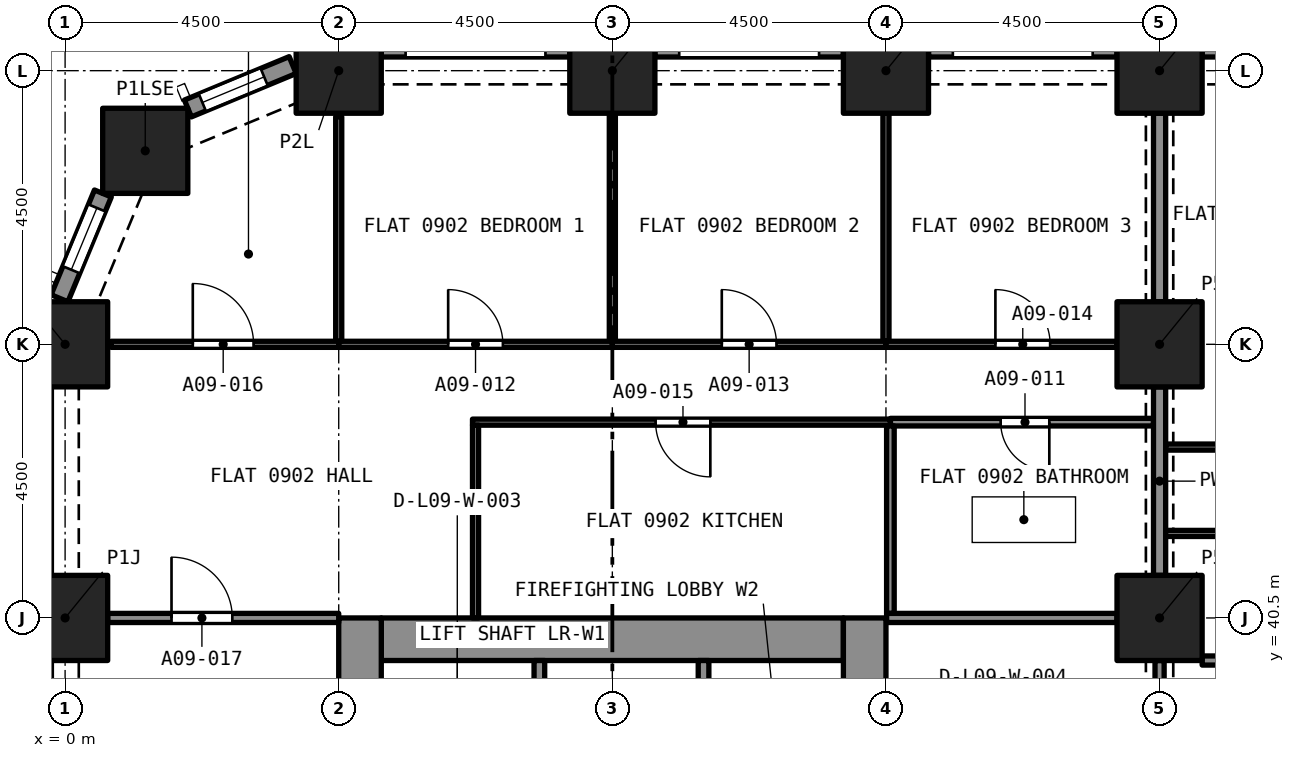
"""IFC4 building model, lengths in metres.
Left out: names, types, materials, properties, quantities, classifications, styles, units other than length and angle.
Written with IfcOpenShell. Run it as: python <this file> out.ifc"""

import sys

from ifc_helpers import new_model, si_unit, direction, frame, frame_2d, origin, origin_2d, place, context, subcontext, project, spatial, rectangle, extrude, element, fill, save


model = new_model("IFC4")
c1 = context("Model", 3, precision=1e-05, world=origin(), true_north=direction((0.0, 1.0)))
c2 = subcontext(c1, "Body", "Model", "MODEL_VIEW")
j1 = project(units=[si_unit("LENGTHUNIT", "METRE"), si_unit("PLANEANGLEUNIT", "RADIAN")], contexts=[c1])
p1 = place(None, origin())
s1 = spatial("IfcSite", under=j1, at=p1, CompositionType="ELEMENT")
p2 = place(p1, origin())
s2 = spatial("IfcBuilding", under=s1, at=p2, CompositionType="ELEMENT")
p3 = place(p2, frame((0.0, 0.0, 40.0)))
s3 = spatial("IfcBuildingStorey", under=s2, at=p3, CompositionType="ELEMENT", Elevation=40.0)
for number, where, z_axis, x_axis in (
    (1, (0.0, 40.5, 0.0), (0.0, 0.0, 1.0), (1.0, 0.0, 0.0)),
    (2, (18.0, 40.5, 0.0), (0.0, 0.0, 1.0), (1.0, 0.0, 0.0)),
    (3, (0.0, 45.0, 0.0), (0.0, 0.0, 1.0), (1.0, 0.0, 0.0)),
    (4, (18.0, 45.0, 0.0), (0.0, 0.0, 1.0), (1.0, 0.0, 0.0)),
    (5, (1.318, 48.182, 0.0), (0.0, 0.0, 1.0), (1.0, 0.0, 0.0)),
    (6, (4.5, 49.5, 0.0), (0.0, 0.0, 1.0), (1.0, 0.0, 0.0)),
    (7, (9.0, 49.5, 0.0), (0.0, 0.0, 1.0), (1.0, 0.0, 0.0)),
    (8, (13.5, 49.5, 0.0), (0.0, 0.0, 1.0), (1.0, 0.0, 0.0)),
    (9, (18.0, 49.5, 0.0), (0.0, 0.0, 1.0), (1.0, 0.0, 0.0)),
):
    element("IfcColumn", number, at=place(p3, frame(where, z_axis=z_axis, x_axis=x_axis)), inside=s3, PredefinedType="COLUMN", context=c2, shape_type="SweptSolid", body=[
        extrude(rectangle(XDim=1.4, YDim=1.4, at=origin_2d()), origin(), (0.0, 0.0, 1.0), 3.2),
    ])
p4 = place(p3, frame((5.2, 40.15, 0.0), z_axis=(0.0, 0.0, 1.0), x_axis=(1.0, 0.0, 0.0)))
e10 = element("IfcWall", 10, at=p4, inside=s3, PredefinedType="SOLIDWALL", context=c2, shape_type="SweptSolid", body=[
    extrude(rectangle(XDim=7.6, YDim=0.7, at=frame_2d((3.8, 0.0))), origin(), (0.0, 0.0, 1.0), 3.2),
])
p5 = place(p3, frame((4.85, 27.0, 0.0), z_axis=(0.0, 0.0, 1.0), x_axis=(0.0, 1.0, 0.0)))
e11 = element("IfcWall", 11, at=p5, inside=s3, PredefinedType="SOLIDWALL", context=c2, shape_type="SweptSolid", body=[
    extrude(rectangle(XDim=13.5, YDim=0.7, at=frame_2d((6.75, 0.0))), origin(), (0.0, 0.0, 1.0), 3.2),
])
p6 = place(p5, frame((8.95, 0.0, 0.0)))
e12 = element("IfcOpeningElement", 12, at=p6, cuts=e11, PredefinedType="OPENING", context=c2, shape_type="SweptSolid", body=[
    extrude(rectangle(XDim=1.2, YDim=2.1, at=frame_2d((0.6, 1.05))), frame((0.0, 0.36, 0.0), z_axis=(0.0, -1.0, 0.0), x_axis=(1.0, 0.0, 0.0)), (0.0, 0.0, 1.0), 0.72),
])
p7 = place(p3, frame((13.15, 27.0, 0.0), z_axis=(0.0, 0.0, 1.0), x_axis=(0.0, 1.0, 0.0)))
e13 = element("IfcWall", 13, at=p7, inside=s3, PredefinedType="SOLIDWALL", context=c2, shape_type="SweptSolid", body=[
    extrude(rectangle(XDim=13.5, YDim=0.7, at=frame_2d((6.75, 0.0))), origin(), (0.0, 0.0, 1.0), 3.2),
])
p8 = place(p7, frame((11.1, 0.0, 0.0)))
e14 = element("IfcOpeningElement", 14, at=p8, cuts=e13, PredefinedType="OPENING", context=c2, shape_type="SweptSolid", body=[
    extrude(rectangle(XDim=1.1, YDim=2.1, at=frame_2d((0.55, 1.05))), frame((0.0, 0.36, 0.0), z_axis=(0.0, -1.0, 0.0), x_axis=(1.0, 0.0, 0.0)), (0.0, 0.0, 1.0), 0.72),
])
p9 = place(p7, frame((8.95, 0.0, 0.0)))
e15 = element("IfcOpeningElement", 15, at=p9, cuts=e13, PredefinedType="OPENING", context=c2, shape_type="SweptSolid", body=[
    extrude(rectangle(XDim=1.2, YDim=2.1, at=frame_2d((0.6, 1.05))), frame((0.0, 0.36, 0.0), z_axis=(0.0, -1.0, 0.0), x_axis=(1.0, 0.0, 0.0)), (0.0, 0.0, 1.0), 0.72),
])
p10 = place(p3, frame((18.7, 49.875, 0.0), z_axis=(0.0, 0.0, 1.0), x_axis=(1.0, 0.0, 0.0)))
e16 = element("IfcWall", 16, at=p10, inside=s3, PredefinedType="SOLIDWALL", context=c2, shape_type="SweptSolid", body=[
    extrude(rectangle(XDim=3.1, YDim=0.3, at=frame_2d((1.55, 0.0))), origin(), (0.0, 0.0, 1.0), 3.2),
])
p11 = place(p10, frame((0.4, 0.0, 0.45)))
e17 = element("IfcOpeningElement", 17, at=p11, cuts=e16, PredefinedType="OPENING", context=c2, shape_type="SweptSolid", body=[
    extrude(rectangle(XDim=2.3, YDim=1.95, at=frame_2d((1.15, 0.975))), frame((0.0, 0.16, 0.0), z_axis=(0.0, -1.0, 0.0), x_axis=(1.0, 0.0, 0.0)), (0.0, 0.0, 1.0), 0.32),
])
p12 = place(p3, frame((14.2, 49.875, 0.0), z_axis=(0.0, 0.0, 1.0), x_axis=(1.0, 0.0, 0.0)))
e18 = element("IfcWall", 18, at=p12, inside=s3, PredefinedType="SOLIDWALL", context=c2, shape_type="SweptSolid", body=[
    extrude(rectangle(XDim=3.1, YDim=0.3, at=frame_2d((1.55, 0.0))), origin(), (0.0, 0.0, 1.0), 3.2),
])
p13 = place(p12, frame((0.4, 0.0, 0.45)))
e19 = element("IfcOpeningElement", 19, at=p13, cuts=e18, PredefinedType="OPENING", context=c2, shape_type="SweptSolid", body=[
    extrude(rectangle(XDim=2.3, YDim=1.95, at=frame_2d((1.15, 0.975))), frame((0.0, 0.16, 0.0), z_axis=(0.0, -1.0, 0.0), x_axis=(1.0, 0.0, 0.0)), (0.0, 0.0, 1.0), 0.32),
])
p14 = place(p3, frame((9.7, 49.875, 0.0), z_axis=(0.0, 0.0, 1.0), x_axis=(1.0, 0.0, 0.0)))
e20 = element("IfcWall", 20, at=p14, inside=s3, PredefinedType="SOLIDWALL", context=c2, shape_type="SweptSolid", body=[
    extrude(rectangle(XDim=3.1, YDim=0.3, at=frame_2d((1.55, 0.0))), origin(), (0.0, 0.0, 1.0), 3.2),
])
p15 = place(p14, frame((0.4, 0.0, 0.45)))
e21 = element("IfcOpeningElement", 21, at=p15, cuts=e20, PredefinedType="OPENING", context=c2, shape_type="SweptSolid", body=[
    extrude(rectangle(XDim=2.3, YDim=1.95, at=frame_2d((1.15, 0.975))), frame((0.0, 0.16, 0.0), z_axis=(0.0, -1.0, 0.0), x_axis=(1.0, 0.0, 0.0)), (0.0, 0.0, 1.0), 0.32),
])
p16 = place(p3, frame((5.2, 49.875, 0.0), z_axis=(0.0, 0.0, 1.0), x_axis=(1.0, 0.0, 0.0)))
e22 = element("IfcWall", 22, at=p16, inside=s3, PredefinedType="SOLIDWALL", context=c2, shape_type="SweptSolid", body=[
    extrude(rectangle(XDim=3.1, YDim=0.3, at=frame_2d((1.55, 0.0))), origin(), (0.0, 0.0, 1.0), 3.2),
])
p17 = place(p16, frame((0.4, 0.0, 0.45)))
e23 = element("IfcOpeningElement", 23, at=p17, cuts=e22, PredefinedType="OPENING", context=c2, shape_type="SweptSolid", body=[
    extrude(rectangle(XDim=2.3, YDim=1.95, at=frame_2d((1.15, 0.975))), frame((0.0, 0.16, 0.0), z_axis=(0.0, -1.0, 0.0), x_axis=(1.0, 0.0, 0.0)), (0.0, 0.0, 1.0), 0.32),
])
p18 = place(p3, frame((2.02, 48.878, 0.0), z_axis=(0.0, 0.0, 1.0), x_axis=(0.923903565336, 0.38262540684, 0.0)))
e24 = element("IfcWall", 24, at=p18, inside=s3, PredefinedType="SOLIDWALL", context=c2, shape_type="SweptSolid", body=[
    extrude(rectangle(XDim=1.865, YDim=0.3, at=frame_2d((0.933, 0.0))), origin(), (0.0, 0.0, 1.0), 3.2),
])
p19 = place(p18, frame((0.258, 0.0, 0.45)))
e25 = element("IfcOpeningElement", 25, at=p19, cuts=e24, PredefinedType="OPENING", context=c2, shape_type="SweptSolid", body=[
    extrude(rectangle(XDim=1.1, YDim=1.95, at=frame_2d((0.55, 0.975))), frame((0.0, 0.16, 0.0), z_axis=(0.0, -1.0, 0.0), x_axis=(1.0, 0.0, 0.0)), (0.0, 0.0, 1.0), 0.32),
])
p20 = place(p3, frame((-0.092, 45.757, 0.0), z_axis=(0.0, 0.0, 1.0), x_axis=(0.382737135771, 0.923857286003, 0.0)))
e26 = element("IfcWall", 26, at=p20, inside=s3, PredefinedType="SOLIDWALL", context=c2, shape_type="SweptSolid", body=[
    extrude(rectangle(XDim=1.865, YDim=0.3, at=frame_2d((0.933, 0.0))), origin(), (0.0, 0.0, 1.0), 3.2),
])
p21 = place(p20, frame((0.508, 0.0, 0.45)))
e27 = element("IfcOpeningElement", 27, at=p21, cuts=e26, PredefinedType="OPENING", context=c2, shape_type="SweptSolid", body=[
    extrude(rectangle(XDim=1.1, YDim=1.95, at=frame_2d((0.55, 0.975))), frame((0.0, 0.16, 0.0), z_axis=(0.0, -1.0, 0.0), x_axis=(1.0, 0.0, 0.0)), (0.0, 0.0, 1.0), 0.32),
])
p22 = place(p3, frame((17.9, 43.72, 0.0), z_axis=(0.0, 0.0, 1.0), x_axis=(-1.0, 0.0, 0.0)))
e28 = element("IfcWall", 28, at=p22, inside=s3, PredefinedType="PARTITIONING", context=c2, shape_type="SweptSolid", body=[
    extrude(rectangle(XDim=4.327, YDim=0.125, at=frame_2d((2.163, 0.0))), origin(), (0.0, 0.0, 1.0), 2.9),
])
p23 = place(p22, frame((1.713, 0.0, 0.0)))
e29 = element("IfcOpeningElement", 29, at=p23, cuts=e28, PredefinedType="OPENING", context=c2, shape_type="SweptSolid", body=[
    extrude(rectangle(XDim=0.8, YDim=2.1, at=frame_2d((0.4, 1.05))), frame((0.0, 0.073, 0.0), z_axis=(0.0, -1.0, 0.0), x_axis=(1.0, 0.0, 0.0)), (0.0, 0.0, 1.0), 0.145),
])
p24 = place(p3, frame((13.573, 40.575, 0.0), z_axis=(0.0, 0.0, 1.0), x_axis=(0.0, 1.0, 0.0)))
e30 = element("IfcWall", 30, at=p24, inside=s3, PredefinedType="PARTITIONING", context=c2, shape_type="SweptSolid", body=[
    extrude(rectangle(XDim=3.083, YDim=0.125, at=frame_2d((1.541, 0.0))), origin(), (0.0, 0.0, 1.0), 2.9),
])
p25 = place(p3, frame((18.0, 41.2, 0.0), z_axis=(0.0, 0.0, 1.0), x_axis=(0.0, 1.0, 0.0)))
e31 = element("IfcWall", 31, at=p25, inside=s3, PredefinedType="PARTITIONING", context=c2, shape_type="SweptSolid", body=[
    extrude(rectangle(XDim=3.1, YDim=0.2, at=frame_2d((1.55, 0.0))), origin(), (0.0, 0.0, 1.0), 2.38),
])
p26 = place(p3, frame((13.511, 40.5, 0.0), z_axis=(0.0, 0.0, 1.0), x_axis=(1.0, 0.0, 0.0)))
e32 = element("IfcWall", 32, at=p26, inside=s3, PredefinedType="PARTITIONING", context=c2, shape_type="SweptSolid", body=[
    extrude(rectangle(XDim=3.789, YDim=0.15, at=frame_2d((1.895, 0.0))), origin(), (0.0, 0.0, 1.0), 2.9),
])
p27 = place(p3, frame((9.0, 45.05, 0.0), z_axis=(0.0, 0.0, 1.0), x_axis=(0.0, 1.0, 0.0)))
e33 = element("IfcWall", 33, at=p27, inside=s3, PredefinedType="PARTITIONING", context=c2, shape_type="SweptSolid", body=[
    extrude(rectangle(XDim=3.75, YDim=0.1, at=frame_2d((1.875, 0.0))), origin(), (0.0, 0.0, 1.0), 2.9),
])
p28 = place(p3, frame((4.5, 45.0, 0.0), z_axis=(0.0, 0.0, 1.0), x_axis=(1.0, 0.0, 0.0)))
e34 = element("IfcWall", 34, at=p28, inside=s3, PredefinedType="PARTITIONING", context=c2, shape_type="SweptSolid", body=[
    extrude(rectangle(XDim=4.5, YDim=0.1, at=frame_2d((2.25, 0.0))), origin(), (0.0, 0.0, 1.0), 2.9),
])
p29 = place(p28, frame((1.8, 0.0, 0.0)))
e35 = element("IfcOpeningElement", 35, at=p29, cuts=e34, PredefinedType="OPENING", context=c2, shape_type="SweptSolid", body=[
    extrude(rectangle(XDim=0.9, YDim=2.1, at=frame_2d((0.45, 1.05))), frame((0.0, 0.06, 0.0), z_axis=(0.0, -1.0, 0.0), x_axis=(1.0, 0.0, 0.0)), (0.0, 0.0, 1.0), 0.12),
])
p30 = place(p3, frame((4.5, 45.05, 0.0), z_axis=(0.0, 0.0, 1.0), x_axis=(0.0, 1.0, 0.0)))
e36 = element("IfcWall", 36, at=p30, inside=s3, PredefinedType="PARTITIONING", context=c2, shape_type="SweptSolid", body=[
    extrude(rectangle(XDim=3.692, YDim=0.1, at=frame_2d((1.846, 0.0))), origin(), (0.0, 0.0, 1.0), 2.9),
])
p31 = place(p3, frame((13.5, 45.05, 0.0), z_axis=(0.0, 0.0, 1.0), x_axis=(0.0, 1.0, 0.0)))
e37 = element("IfcWall", 37, at=p31, inside=s3, PredefinedType="PARTITIONING", context=c2, shape_type="SweptSolid", body=[
    extrude(rectangle(XDim=3.75, YDim=0.1, at=frame_2d((1.875, 0.0))), origin(), (0.0, 0.0, 1.0), 2.9),
])
p32 = place(p3, frame((9.0, 45.0, 0.0), z_axis=(0.0, 0.0, 1.0), x_axis=(1.0, 0.0, 0.0)))
e38 = element("IfcWall", 38, at=p32, inside=s3, PredefinedType="PARTITIONING", context=c2, shape_type="SweptSolid", body=[
    extrude(rectangle(XDim=4.5, YDim=0.1, at=frame_2d((2.25, 0.0))), origin(), (0.0, 0.0, 1.0), 2.9),
])
p33 = place(p32, frame((1.8, 0.0, 0.0)))
e39 = element("IfcOpeningElement", 39, at=p33, cuts=e38, PredefinedType="OPENING", context=c2, shape_type="SweptSolid", body=[
    extrude(rectangle(XDim=0.9, YDim=2.1, at=frame_2d((0.45, 1.05))), frame((0.0, 0.06, 0.0), z_axis=(0.0, -1.0, 0.0), x_axis=(1.0, 0.0, 0.0)), (0.0, 0.0, 1.0), 0.12),
])
p34 = place(p3, frame((13.5, 45.0, 0.0), z_axis=(0.0, 0.0, 1.0), x_axis=(1.0, 0.0, 0.0)))
e40 = element("IfcWall", 40, at=p34, inside=s3, PredefinedType="PARTITIONING", context=c2, shape_type="SweptSolid", body=[
    extrude(rectangle(XDim=3.8, YDim=0.1, at=frame_2d((1.9, 0.0))), origin(), (0.0, 0.0, 1.0), 2.9),
])
p35 = place(p34, frame((1.8, 0.0, 0.0)))
e41 = element("IfcOpeningElement", 41, at=p35, cuts=e40, PredefinedType="OPENING", context=c2, shape_type="SweptSolid", body=[
    extrude(rectangle(XDim=0.9, YDim=2.1, at=frame_2d((0.45, 1.05))), frame((0.0, 0.06, 0.0), z_axis=(0.0, -1.0, 0.0), x_axis=(1.0, 0.0, 0.0)), (0.0, 0.0, 1.0), 0.12),
])
p36 = place(p3, frame((18.0, 45.7, 0.0), z_axis=(0.0, 0.0, 1.0), x_axis=(0.0, 1.0, 0.0)))
e42 = element("IfcWall", 42, at=p36, inside=s3, PredefinedType="PARTITIONING", context=c2, shape_type="SweptSolid", body=[
    extrude(rectangle(XDim=3.1, YDim=0.2, at=frame_2d((1.55, 0.0))), origin(), (0.0, 0.0, 1.0), 2.38),
])
p37 = place(p3, frame((13.573, 43.72, 0.0), z_axis=(0.0, 0.0, 1.0), x_axis=(-1.0, 0.0, 0.0)))
e43 = element("IfcWall", 43, at=p37, inside=s3, PredefinedType="PARTITIONING", context=c2, shape_type="SweptSolid", body=[
    extrude(rectangle(XDim=6.873, YDim=0.1, at=frame_2d((3.437, 0.0))), origin(), (0.0, 0.0, 1.0), 2.9),
])
p38 = place(p37, frame((2.962, 0.0, 0.0)))
e44 = element("IfcOpeningElement", 44, at=p38, cuts=e43, PredefinedType="OPENING", context=c2, shape_type="SweptSolid", body=[
    extrude(rectangle(XDim=0.9, YDim=2.1, at=frame_2d((0.45, 1.05))), frame((0.0, 0.06, 0.0), z_axis=(0.0, -1.0, 0.0), x_axis=(1.0, 0.0, 0.0)), (0.0, 0.0, 1.0), 0.12),
])
p39 = place(p3, frame((6.75, 40.5, 0.0), z_axis=(0.0, 0.0, 1.0), x_axis=(0.0, 1.0, 0.0)))
e45 = element("IfcWall", 45, at=p39, inside=s3, PredefinedType="PARTITIONING", context=c2, shape_type="SweptSolid", body=[
    extrude(rectangle(XDim=3.17, YDim=0.1, at=frame_2d((1.585, 0.0))), origin(), (0.0, 0.0, 1.0), 2.9),
])
p40 = place(p3, frame((0.758, 45.0, 0.0), z_axis=(0.0, 0.0, 1.0), x_axis=(1.0, 0.0, 0.0)))
e46 = element("IfcWall", 46, at=p40, inside=s3, PredefinedType="PARTITIONING", context=c2, shape_type="SweptSolid", body=[
    extrude(rectangle(XDim=3.742, YDim=0.1, at=frame_2d((1.871, 0.0))), origin(), (0.0, 0.0, 1.0), 2.9),
])
p41 = place(p40, frame((1.342, 0.0, 0.0)))
e47 = element("IfcOpeningElement", 47, at=p41, cuts=e46, PredefinedType="OPENING", context=c2, shape_type="SweptSolid", body=[
    extrude(rectangle(XDim=1.0, YDim=2.1, at=frame_2d((0.5, 1.05))), frame((0.0, 0.06, 0.0), z_axis=(0.0, -1.0, 0.0), x_axis=(1.0, 0.0, 0.0)), (0.0, 0.0, 1.0), 0.12),
])
p42 = place(p3, frame((0.7, 40.5, 0.0), z_axis=(0.0, 0.0, 1.0), x_axis=(1.0, 0.0, 0.0)))
e48 = element("IfcWall", 48, at=p42, inside=s3, PredefinedType="PARTITIONING", context=c2, shape_type="SweptSolid", body=[
    extrude(rectangle(XDim=3.8, YDim=0.15, at=frame_2d((1.9, 0.0))), origin(), (0.0, 0.0, 1.0), 2.9),
])
p43 = place(p42, frame((1.05, 0.0, 0.0)))
e49 = element("IfcOpeningElement", 49, at=p43, cuts=e48, PredefinedType="OPENING", context=c2, shape_type="SweptSolid", body=[
    extrude(rectangle(XDim=1.0, YDim=2.1, at=frame_2d((0.5, 1.05))), frame((0.0, 0.085, 0.0), z_axis=(0.0, -1.0, 0.0), x_axis=(1.0, 0.0, 0.0)), (0.0, 0.0, 1.0), 0.17),
])
p44 = place(p3, frame((27.425, 41.89, 0.0), z_axis=(0.0, 0.0, 1.0), x_axis=(-1.0, 0.0, 0.0)))
e50 = element("IfcWall", 50, at=p44, inside=s3, PredefinedType="PARTITIONING", context=c2, shape_type="SweptSolid", body=[
    extrude(rectangle(XDim=9.325, YDim=0.1, at=frame_2d((4.663, 0.0))), origin(), (0.0, 0.0, 1.0), 2.75),
])
p45 = place(p44, frame((4.288, 0.0, 0.0)))
e51 = element("IfcOpeningElement", 51, at=p45, cuts=e50, PredefinedType="OPENING", context=c2, shape_type="SweptSolid", body=[
    extrude(rectangle(XDim=0.9, YDim=2.1, at=frame_2d((0.45, 1.05))), frame((0.0, 0.06, 0.0), z_axis=(0.0, -1.0, 0.0), x_axis=(1.0, 0.0, 0.0)), (0.0, 0.0, 1.0), 0.12),
])
p46 = place(p3, frame((18.1, 43.31, 0.0), z_axis=(0.0, 0.0, 1.0), x_axis=(1.0, 0.0, 0.0)))
e52 = element("IfcWall", 52, at=p46, inside=s3, PredefinedType="PARTITIONING", context=c2, shape_type="SweptSolid", body=[
    extrude(rectangle(XDim=4.4, YDim=0.1, at=frame_2d((2.2, 0.0))), origin(), (0.0, 0.0, 1.0), 2.75),
])
p47 = place(p46, frame((1.65, 0.0, 0.0)))
e53 = element("IfcOpeningElement", 53, at=p47, cuts=e52, PredefinedType="OPENING", context=c2, shape_type="SweptSolid", body=[
    extrude(rectangle(XDim=1.0, YDim=2.1, at=frame_2d((0.5, 1.05))), frame((0.0, 0.06, 0.0), z_axis=(0.0, -1.0, 0.0), x_axis=(1.0, 0.0, 0.0)), (0.0, 0.0, 1.0), 0.12),
])
p48 = place(p3, frame((18.7, 39.8, 0.0), z_axis=(0.0, 0.0, 1.0), x_axis=(1.0, 0.0, 0.0)))
e54 = element("IfcWall", 54, at=p48, inside=s3, PredefinedType="PARTITIONING", context=c2, shape_type="SweptSolid", body=[
    extrude(rectangle(XDim=8.675, YDim=0.15, at=frame_2d((4.337, 0.0))), origin(), (0.0, 0.0, 1.0), 2.75),
])
p49 = place(p3, frame((18.0, 39.8, 0.0), z_axis=(0.0, 0.0, 1.0), x_axis=(0.0, -1.0, 0.0)))
e55 = element("IfcWall", 55, at=p49, inside=s3, PredefinedType="PARTITIONING", context=c2, shape_type="SweptSolid", body=[
    extrude(rectangle(XDim=3.1, YDim=0.15, at=frame_2d((1.55, 0.0))), origin(), (0.0, 0.0, 1.0), 2.38),
])
p50 = place(p49, frame((0.95, 0.0, 0.0)))
e56 = element("IfcOpeningElement", 56, at=p50, cuts=e55, PredefinedType="OPENING", context=c2, shape_type="SweptSolid", body=[
    extrude(rectangle(XDim=1.2, YDim=2.1, at=frame_2d((0.6, 1.05))), frame((0.0, 0.085, 0.0), z_axis=(0.0, -1.0, 0.0), x_axis=(1.0, 0.0, 0.0)), (0.0, 0.0, 1.0), 0.17),
])
p51 = place(p3, frame((7.8, 37.5, 0.0), z_axis=(0.0, 0.0, 1.0), x_axis=(0.0, 1.0, 0.0)))
e57 = element("IfcWall", 57, at=p51, inside=s3, PredefinedType="SOLIDWALL", context=c2, shape_type="SweptSolid", body=[
    extrude(rectangle(XDim=2.3, YDim=0.175, at=frame_2d((1.15, 0.0))), origin(), (0.0, 0.0, 1.0), 2.9),
])
p52 = place(p3, frame((10.5, 37.5, 0.0), z_axis=(0.0, 0.0, 1.0), x_axis=(0.0, 1.0, 0.0)))
e58 = element("IfcWall", 58, at=p52, inside=s3, PredefinedType="SOLIDWALL", context=c2, shape_type="SweptSolid", body=[
    extrude(rectangle(XDim=2.3, YDim=0.175, at=frame_2d((1.15, 0.0))), origin(), (0.0, 0.0, 1.0), 2.9),
])
p53 = place(p52, frame((0.65, 0.0, 0.0)))
e59 = element("IfcOpeningElement", 59, at=p53, cuts=e58, PredefinedType="OPENING", context=c2, shape_type="SweptSolid", body=[
    extrude(rectangle(XDim=1.0, YDim=2.1, at=frame_2d((0.5, 1.05))), frame((0.0, 0.097, 0.0), z_axis=(0.0, -1.0, 0.0), x_axis=(1.0, 0.0, 0.0)), (0.0, 0.0, 1.0), 0.195),
])
p54 = place(p19, origin())
e60 = element("IfcWindow", 60, at=p54, inside=s3, PartitioningType="SINGLE_PANEL", PredefinedType="WINDOW", context=c2, shape_type="SweptSolid", body=[
    extrude(rectangle(XDim=1.1, YDim=1.95, at=frame_2d((0.55, 0.975))), frame((0.0, 0.03, 0.0), z_axis=(0.0, -1.0, 0.0), x_axis=(1.0, 0.0, 0.0)), (0.0, 0.0, 1.0), 0.06),
])
fill(e25, e60)
p55 = place(p21, origin())
e61 = element("IfcWindow", 61, at=p55, inside=s3, PartitioningType="SINGLE_PANEL", PredefinedType="WINDOW", context=c2, shape_type="SweptSolid", body=[
    extrude(rectangle(XDim=1.1, YDim=1.95, at=frame_2d((0.55, 0.975))), frame((0.0, 0.03, 0.0), z_axis=(0.0, -1.0, 0.0), x_axis=(1.0, 0.0, 0.0)), (0.0, 0.0, 1.0), 0.06),
])
fill(e27, e61)
p56 = place(p23, origin())
e62 = element("IfcDoor", 62, at=p56, inside=s3, OperationType="SINGLE_SWING_LEFT", PredefinedType="DOOR", context=c2, shape_type="SweptSolid", body=[
    extrude(rectangle(XDim=0.8, YDim=2.1, at=frame_2d((0.4, 1.05))), frame((0.0, 0.025, 0.0), z_axis=(0.0, -1.0, 0.0), x_axis=(1.0, 0.0, 0.0)), (0.0, 0.0, 1.0), 0.05),
])
fill(e29, e62)
p57 = place(p29, origin())
e63 = element("IfcDoor", 63, at=p57, inside=s3, OperationType="SINGLE_SWING_RIGHT", PredefinedType="DOOR", context=c2, shape_type="SweptSolid", body=[
    extrude(rectangle(XDim=0.9, YDim=2.1, at=frame_2d((0.45, 1.05))), frame((0.0, 0.025, 0.0), z_axis=(0.0, -1.0, 0.0), x_axis=(1.0, 0.0, 0.0)), (0.0, 0.0, 1.0), 0.05),
])
fill(e35, e63)
p58 = place(p33, origin())
e64 = element("IfcDoor", 64, at=p58, inside=s3, OperationType="SINGLE_SWING_LEFT", PredefinedType="DOOR", context=c2, shape_type="SweptSolid", body=[
    extrude(rectangle(XDim=0.9, YDim=2.1, at=frame_2d((0.45, 1.05))), frame((0.0, 0.025, 0.0), z_axis=(0.0, -1.0, 0.0), x_axis=(1.0, 0.0, 0.0)), (0.0, 0.0, 1.0), 0.05),
])
fill(e39, e64)
p59 = place(p35, origin())
e65 = element("IfcDoor", 65, at=p59, inside=s3, OperationType="SINGLE_SWING_RIGHT", PredefinedType="DOOR", context=c2, shape_type="SweptSolid", body=[
    extrude(rectangle(XDim=0.9, YDim=2.1, at=frame_2d((0.45, 1.05))), frame((0.0, 0.025, 0.0), z_axis=(0.0, -1.0, 0.0), x_axis=(1.0, 0.0, 0.0)), (0.0, 0.0, 1.0), 0.05),
])
fill(e41, e65)
p60 = place(p38, origin())
e66 = element("IfcDoor", 66, at=p60, inside=s3, OperationType="SINGLE_SWING_LEFT", PredefinedType="DOOR", context=c2, shape_type="SweptSolid", body=[
    extrude(rectangle(XDim=0.9, YDim=2.1, at=frame_2d((0.45, 1.05))), frame((0.0, 0.025, 0.0), z_axis=(0.0, -1.0, 0.0), x_axis=(1.0, 0.0, 0.0)), (0.0, 0.0, 1.0), 0.05),
])
fill(e44, e66)
p61 = place(p41, origin())
e67 = element("IfcDoor", 67, at=p61, inside=s3, OperationType="SINGLE_SWING_LEFT", PredefinedType="DOOR", context=c2, shape_type="SweptSolid", body=[
    extrude(rectangle(XDim=1.0, YDim=2.1, at=frame_2d((0.5, 1.05))), frame((0.0, 0.025, 0.0), z_axis=(0.0, -1.0, 0.0), x_axis=(1.0, 0.0, 0.0)), (0.0, 0.0, 1.0), 0.05),
])
fill(e47, e67)
p62 = place(p43, origin())
e68 = element("IfcDoor", 68, at=p62, inside=s3, OperationType="SINGLE_SWING_LEFT", PredefinedType="DOOR", context=c2, shape_type="SweptSolid", body=[
    extrude(rectangle(XDim=1.0, YDim=2.1, at=frame_2d((0.5, 1.05))), frame((0.0, 0.025, 0.0), z_axis=(0.0, -1.0, 0.0), x_axis=(1.0, 0.0, 0.0)), (0.0, 0.0, 1.0), 0.05),
])
fill(e49, e68)
save(model, sys.argv[1])
